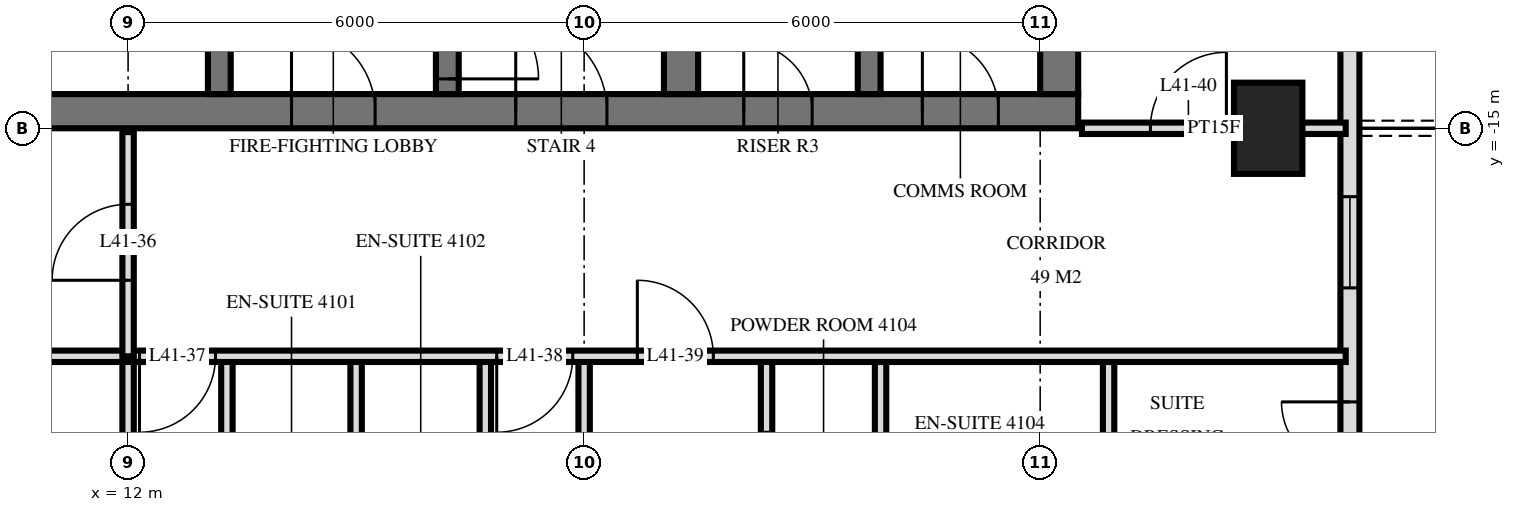
"""IFC4 building model, lengths in metres.
Left out: names, types, materials, properties, quantities, classifications, styles, units other than length and angle.
Written with IfcOpenShell. Run it as: python <this file> out.ifc"""

import sys

from ifc_helpers import new_model, si_unit, direction, frame, frame_2d, origin, origin_2d, place, context, subcontext, project, spatial, rectangle, extrude, element, fill, save


model = new_model("IFC4")
c1 = context("Model", 3, precision=1e-05, world=origin(), true_north=direction((0.0, 1.0)))
c2 = subcontext(c1, "Body", "Model", "MODEL_VIEW")
j1 = project(units=[si_unit("LENGTHUNIT", "METRE"), si_unit("PLANEANGLEUNIT", "RADIAN")], contexts=[c1])
p1 = place(None, origin())
s1 = spatial("IfcSite", under=j1, at=p1, CompositionType="ELEMENT")
p2 = place(p1, origin())
s2 = spatial("IfcBuilding", under=s1, at=p2, CompositionType="ELEMENT")
p3 = place(p2, frame((0.0, 0.0, 159.6)))
s3 = spatial("IfcBuildingStorey", under=s2, at=p3, CompositionType="ELEMENT", Elevation=159.6)
p4 = place(p3, frame((27.0, -15.0, 0.0), z_axis=(0.0, 0.0, 1.0), x_axis=(0.0, 1.0, 0.0)))
e1 = element("IfcColumn", 1, at=p4, inside=s3, PredefinedType="COLUMN", context=c2, shape_type="SweptSolid", body=[
    extrude(rectangle(XDim=1.2, YDim=0.9, at=origin_2d()), origin(), (0.0, 0.0, 1.0), 3.6),
])
p5 = place(p3, frame((10.0, -14.775, 0.0), z_axis=(0.0, 0.0, 1.0), x_axis=(1.0, 0.0, 0.0)))
e2 = element("IfcWall", 2, at=p5, inside=s3, PredefinedType="SHEAR", context=c2, shape_type="SweptSolid", body=[
    extrude(rectangle(XDim=14.5, YDim=0.45, at=frame_2d((7.25, 0.0))), origin(), (0.0, 0.0, 1.0), 3.6),
])
p6 = place(p5, frame((7.1, 0.0, 0.0)))
e3 = element("IfcOpeningElement", 3, at=p6, cuts=e2, PredefinedType="OPENING", context=c2, shape_type="SweptSolid", body=[
    extrude(rectangle(XDim=1.2, YDim=2.1, at=frame_2d((0.6, 1.05))), frame((0.0, 0.235, 0.0), z_axis=(0.0, -1.0, 0.0), x_axis=(1.0, 0.0, 0.0)), (0.0, 0.0, 1.0), 0.47),
])
p7 = place(p5, frame((4.15, 0.0, 0.0)))
e4 = element("IfcOpeningElement", 4, at=p7, cuts=e2, PredefinedType="OPENING", context=c2, shape_type="SweptSolid", body=[
    extrude(rectangle(XDim=1.1, YDim=2.1, at=frame_2d((0.55, 1.05))), frame((0.0, 0.235, 0.0), z_axis=(0.0, -1.0, 0.0), x_axis=(1.0, 0.0, 0.0)), (0.0, 0.0, 1.0), 0.47),
])
p8 = place(p5, frame((10.1, 0.0, 0.0)))
e5 = element("IfcOpeningElement", 5, at=p8, cuts=e2, PredefinedType="OPENING", context=c2, shape_type="SweptSolid", body=[
    extrude(rectangle(XDim=0.9, YDim=2.1, at=frame_2d((0.45, 1.05))), frame((0.0, 0.235, 0.0), z_axis=(0.0, -1.0, 0.0), x_axis=(1.0, 0.0, 0.0)), (0.0, 0.0, 1.0), 0.47),
])
p9 = place(p5, frame((12.45, 0.0, 0.0)))
e6 = element("IfcOpeningElement", 6, at=p9, cuts=e2, PredefinedType="OPENING", context=c2, shape_type="SweptSolid", body=[
    extrude(rectangle(XDim=1.0, YDim=2.1, at=frame_2d((0.5, 1.05))), frame((0.0, 0.235, 0.0), z_axis=(0.0, -1.0, 0.0), x_axis=(1.0, 0.0, 0.0)), (0.0, 0.0, 1.0), 0.47),
])
p10 = place(p3, frame((24.25, -14.55, 0.0), z_axis=(0.0, 0.0, 1.0), x_axis=(0.0, 1.0, 0.0)))
e7 = element("IfcWall", 7, at=p10, inside=s3, PredefinedType="SHEAR", context=c2, shape_type="SweptSolid", body=[
    extrude(rectangle(XDim=14.1, YDim=0.5, at=frame_2d((7.05, 0.0))), origin(), (0.0, 0.0, 1.0), 3.6),
])
p11 = place(p3, frame((13.2, -14.55, 0.0), z_axis=(0.0, 0.0, 1.0), x_axis=(0.0, 1.0, 0.0)))
e8 = element("IfcWall", 8, at=p11, inside=s3, PredefinedType="SHEAR", context=c2, shape_type="SweptSolid", body=[
    extrude(rectangle(XDim=5.4, YDim=0.3, at=frame_2d((2.7, 0.0))), origin(), (0.0, 0.0, 1.0), 3.6),
])
p12 = place(p11, frame((4.0, 0.0, 0.0)))
e9 = element("IfcOpeningElement", 9, at=p12, cuts=e8, PredefinedType="OPENING", context=c2, shape_type="SweptSolid", body=[
    extrude(rectangle(XDim=1.2, YDim=2.1, at=frame_2d((0.6, 1.05))), frame((0.0, 0.16, 0.0), z_axis=(0.0, -1.0, 0.0), x_axis=(1.0, 0.0, 0.0)), (0.0, 0.0, 1.0), 0.32),
])
p13 = place(p3, frame((16.2, -14.55, 0.0), z_axis=(0.0, 0.0, 1.0), x_axis=(0.0, 1.0, 0.0)))
e10 = element("IfcWall", 10, at=p13, inside=s3, PredefinedType="SHEAR", context=c2, shape_type="SweptSolid", body=[
    extrude(rectangle(XDim=5.4, YDim=0.3, at=frame_2d((2.7, 0.0))), origin(), (0.0, 0.0, 1.0), 3.6),
])
p14 = place(p13, frame((0.2, 0.0, 0.0)))
e11 = element("IfcOpeningElement", 11, at=p14, cuts=e10, PredefinedType="OPENING", context=c2, shape_type="SweptSolid", body=[
    extrude(rectangle(XDim=1.2, YDim=2.1, at=frame_2d((0.6, 1.05))), frame((0.0, 0.16, 0.0), z_axis=(0.0, -1.0, 0.0), x_axis=(1.0, 0.0, 0.0)), (0.0, 0.0, 1.0), 0.32),
])
p15 = place(p3, frame((19.275, -14.55, 0.0), z_axis=(0.0, 0.0, 1.0), x_axis=(0.0, 1.0, 0.0)))
e12 = element("IfcWall", 12, at=p15, inside=s3, PredefinedType="SHEAR", context=c2, shape_type="SweptSolid", body=[
    extrude(rectangle(XDim=5.4, YDim=0.45, at=frame_2d((2.7, 0.0))), origin(), (0.0, 0.0, 1.0), 3.6),
])
p16 = place(p3, frame((21.75, -14.55, 0.0), z_axis=(0.0, 0.0, 1.0), x_axis=(0.0, 1.0, 0.0)))
e13 = element("IfcWall", 13, at=p16, inside=s3, PredefinedType="SHEAR", context=c2, shape_type="SweptSolid", body=[
    extrude(rectangle(XDim=5.4, YDim=0.3, at=frame_2d((2.7, 0.0))), origin(), (0.0, 0.0, 1.0), 3.6),
])
p17 = place(p3, frame((28.075, -29.275, 0.0), z_axis=(0.0, 0.0, 1.0), x_axis=(0.0, 1.0, 0.0)))
e14 = element("IfcWall", 14, at=p17, inside=s3, PredefinedType="SOLIDWALL", context=c2, shape_type="SweptSolid", body=[
    extrude(rectangle(XDim=25.951, YDim=0.25, at=frame_2d((12.975, 0.0))), origin(), (0.0, 0.0, 1.0), 3.32),
])
p18 = place(p17, frame((0.575, 0.0, 0.0)))
e15 = element("IfcOpeningElement", 15, at=p18, cuts=e14, PredefinedType="OPENING", context=c2, shape_type="SweptSolid", body=[
    extrude(rectangle(XDim=1.8, YDim=2.4, at=frame_2d((0.9, 1.2))), frame((0.0, 0.135, 0.0), z_axis=(0.0, -1.0, 0.0), x_axis=(1.0, 0.0, 0.0)), (0.0, 0.0, 1.0), 0.27),
])
p19 = place(p17, frame((3.325, 0.0, 0.3)))
e16 = element("IfcOpeningElement", 16, at=p19, cuts=e14, PredefinedType="OPENING", context=c2, shape_type="SweptSolid", body=[
    extrude(rectangle(XDim=1.8, YDim=2.1, at=frame_2d((0.9, 1.05))), frame((0.0, 0.135, 0.0), z_axis=(0.0, -1.0, 0.0), x_axis=(1.0, 0.0, 0.0)), (0.0, 0.0, 1.0), 0.27),
])
p20 = place(p17, frame((8.875, 0.0, 0.0)))
e17 = element("IfcOpeningElement", 17, at=p20, cuts=e14, PredefinedType="OPENING", context=c2, shape_type="SweptSolid", body=[
    extrude(rectangle(XDim=1.8, YDim=2.4, at=frame_2d((0.9, 1.2))), frame((0.0, 0.135, 0.0), z_axis=(0.0, -1.0, 0.0), x_axis=(1.0, 0.0, 0.0)), (0.0, 0.0, 1.0), 0.27),
])
p21 = place(p17, frame((12.175, 0.0, 0.3)))
e18 = element("IfcOpeningElement", 18, at=p21, cuts=e14, PredefinedType="OPENING", context=c2, shape_type="SweptSolid", body=[
    extrude(rectangle(XDim=1.2, YDim=2.1, at=frame_2d((0.6, 1.05))), frame((0.0, 0.135, 0.0), z_axis=(0.0, -1.0, 0.0), x_axis=(1.0, 0.0, 0.0)), (0.0, 0.0, 1.0), 0.27),
])
p22 = place(p17, frame((17.5, 0.0, 0.0)))
e19 = element("IfcOpeningElement", 19, at=p22, cuts=e14, PredefinedType="OPENING", context=c2, shape_type="SweptSolid", body=[
    extrude(rectangle(XDim=1.8, YDim=2.4, at=frame_2d((0.9, 1.2))), frame((0.0, 0.135, 0.0), z_axis=(0.0, -1.0, 0.0), x_axis=(1.0, 0.0, 0.0)), (0.0, 0.0, 1.0), 0.27),
])
p23 = place(p3, frame((24.9, -21.0, 0.0), z_axis=(0.0, 0.0, 1.0), x_axis=(0.0, 1.0, 0.0)))
e20 = element("IfcWall", 20, at=p23, inside=s3, PredefinedType="PARTITIONING", context=c2, shape_type="SweptSolid", body=[
    extrude(rectangle(XDim=3.0, YDim=0.15, at=frame_2d((1.5, 0.0))), origin(), (0.0, 0.0, 1.0), 3.32),
])
p24 = place(p3, frame((21.9, -21.0, 0.0), z_axis=(0.0, 0.0, 1.0), x_axis=(0.0, 1.0, 0.0)))
e21 = element("IfcWall", 21, at=p24, inside=s3, PredefinedType="PLUMBINGWALL", context=c2, shape_type="SweptSolid", body=[
    extrude(rectangle(XDim=3.0, YDim=0.15, at=frame_2d((1.5, 0.0))), origin(), (0.0, 0.0, 1.0), 3.32),
])
p25 = place(p3, frame((20.4, -21.0, 0.0), z_axis=(0.0, 0.0, 1.0), x_axis=(0.0, 1.0, 0.0)))
e22 = element("IfcWall", 22, at=p25, inside=s3, PredefinedType="PARTITIONING", context=c2, shape_type="SweptSolid", body=[
    extrude(rectangle(XDim=3.0, YDim=0.15, at=frame_2d((1.5, 0.0))), origin(), (0.0, 0.0, 1.0), 3.32),
])
p26 = place(p25, frame((1.0, 0.0, 0.0)))
e23 = element("IfcOpeningElement", 23, at=p26, cuts=e22, PredefinedType="OPENING", context=c2, shape_type="SweptSolid", body=[
    extrude(rectangle(XDim=1.0, YDim=2.1, at=frame_2d((0.5, 1.05))), frame((0.0, 0.085, 0.0), z_axis=(0.0, -1.0, 0.0), x_axis=(1.0, 0.0, 0.0)), (0.0, 0.0, 1.0), 0.17),
])
p27 = place(p3, frame((18.0, -21.0, 0.0), z_axis=(0.0, 0.0, 1.0), x_axis=(0.0, 1.0, 0.0)))
e24 = element("IfcWall", 24, at=p27, inside=s3, PredefinedType="PARTITIONING", context=c2, shape_type="SweptSolid", body=[
    extrude(rectangle(XDim=3.0, YDim=0.15, at=frame_2d((1.5, 0.0))), origin(), (0.0, 0.0, 1.0), 3.32),
])
p28 = place(p3, frame((16.7, -21.8, 0.0), z_axis=(0.0, 0.0, 1.0), x_axis=(0.0, 1.0, 0.0)))
e25 = element("IfcWall", 25, at=p28, inside=s3, PredefinedType="PARTITIONING", context=c2, shape_type="SweptSolid", body=[
    extrude(rectangle(XDim=3.8, YDim=0.15, at=frame_2d((1.9, 0.0))), origin(), (0.0, 0.0, 1.0), 3.32),
])
p29 = place(p28, frame((1.5, 0.0, 0.0)))
e26 = element("IfcOpeningElement", 26, at=p29, cuts=e25, PredefinedType="OPENING", context=c2, shape_type="SweptSolid", body=[
    extrude(rectangle(XDim=0.8, YDim=2.1, at=frame_2d((0.4, 1.05))), frame((0.0, 0.085, 0.0), z_axis=(0.0, -1.0, 0.0), x_axis=(1.0, 0.0, 0.0)), (0.0, 0.0, 1.0), 0.17),
])
p30 = place(p3, frame((15.0, -33.62, 0.0), z_axis=(0.0, 0.0, 1.0), x_axis=(0.0, 1.0, 0.0)))
e27 = element("IfcWall", 27, at=p30, inside=s3, PredefinedType="PARTITIONING", context=c2, shape_type="SweptSolid", body=[
    extrude(rectangle(XDim=15.62, YDim=0.15, at=frame_2d((7.81, 0.0))), origin(), (0.0, 0.0, 1.0), 3.32),
])
p31 = place(p3, frame((13.3, -21.8, 0.0), z_axis=(0.0, 0.0, 1.0), x_axis=(0.0, 1.0, 0.0)))
e28 = element("IfcWall", 28, at=p31, inside=s3, PredefinedType="PARTITIONING", context=c2, shape_type="SweptSolid", body=[
    extrude(rectangle(XDim=3.8, YDim=0.15, at=frame_2d((1.9, 0.0))), origin(), (0.0, 0.0, 1.0), 3.32),
])
p32 = place(p31, frame((1.5, 0.0, 0.0)))
e29 = element("IfcOpeningElement", 29, at=p32, cuts=e28, PredefinedType="OPENING", context=c2, shape_type="SweptSolid", body=[
    extrude(rectangle(XDim=0.8, YDim=2.1, at=frame_2d((0.4, 1.05))), frame((0.0, 0.085, 0.0), z_axis=(0.0, -1.0, 0.0), x_axis=(1.0, 0.0, 0.0)), (0.0, 0.0, 1.0), 0.17),
])
p33 = place(p3, frame((12.0, -18.0, 0.0), z_axis=(0.0, 0.0, 1.0), x_axis=(0.0, 1.0, 0.0)))
e30 = element("IfcWall", 30, at=p33, inside=s3, PredefinedType="PARTITIONING", context=c2, shape_type="SweptSolid", body=[
    extrude(rectangle(XDim=2.95, YDim=0.15, at=frame_2d((1.475, 0.0))), origin(), (0.0, 0.0, 1.0), 3.32),
])
p34 = place(p33, frame((1.0, 0.0, 0.0)))
e31 = element("IfcOpeningElement", 31, at=p34, cuts=e30, PredefinedType="OPENING", context=c2, shape_type="SweptSolid", body=[
    extrude(rectangle(XDim=1.0, YDim=2.1, at=frame_2d((0.5, 1.05))), frame((0.0, 0.085, 0.0), z_axis=(0.0, -1.0, 0.0), x_axis=(1.0, 0.0, 0.0)), (0.0, 0.0, 1.0), 0.17),
])
p35 = place(p3, frame((12.0, -33.62, 0.0), z_axis=(0.0, 0.0, 1.0), x_axis=(0.0, 1.0, 0.0)))
e32 = element("IfcWall", 32, at=p35, inside=s3, PredefinedType="PARTITIONING", context=c2, shape_type="SweptSolid", body=[
    extrude(rectangle(XDim=15.62, YDim=0.15, at=frame_2d((7.81, 0.0))), origin(), (0.0, 0.0, 1.0), 3.32),
])
p36 = place(p3, frame((-28.02, -18.0, 0.0), z_axis=(0.0, 0.0, 1.0), x_axis=(1.0, 0.0, 0.0)))
e33 = element("IfcWall", 33, at=p36, inside=s3, PredefinedType="PARTITIONING", context=c2, shape_type="SweptSolid", body=[
    extrude(rectangle(XDim=56.04, YDim=0.15, at=frame_2d((28.02, 0.0))), origin(), (0.0, 0.0, 1.0), 3.32),
])
p37 = place(p36, frame((14.32, 0.0, 0.0)))
e34 = element("IfcOpeningElement", 34, at=p37, cuts=e33, PredefinedType="OPENING", context=c2, shape_type="SweptSolid", body=[
    extrude(rectangle(XDim=1.0, YDim=2.1, at=frame_2d((0.5, 1.05))), frame((0.0, 0.085, 0.0), z_axis=(0.0, -1.0, 0.0), x_axis=(1.0, 0.0, 0.0)), (0.0, 0.0, 1.0), 0.17),
])
p38 = place(p36, frame((40.17, 0.0, 0.0)))
e35 = element("IfcOpeningElement", 35, at=p38, cuts=e33, PredefinedType="OPENING", context=c2, shape_type="SweptSolid", body=[
    extrude(rectangle(XDim=1.0, YDim=2.1, at=frame_2d((0.5, 1.05))), frame((0.0, 0.085, 0.0), z_axis=(0.0, -1.0, 0.0), x_axis=(1.0, 0.0, 0.0)), (0.0, 0.0, 1.0), 0.17),
])
p39 = place(p36, frame((44.87, 0.0, 0.0)))
e36 = element("IfcOpeningElement", 36, at=p39, cuts=e33, PredefinedType="OPENING", context=c2, shape_type="SweptSolid", body=[
    extrude(rectangle(XDim=1.0, YDim=2.1, at=frame_2d((0.5, 1.05))), frame((0.0, 0.085, 0.0), z_axis=(0.0, -1.0, 0.0), x_axis=(1.0, 0.0, 0.0)), (0.0, 0.0, 1.0), 0.17),
])
p40 = place(p36, frame((46.72, 0.0, 0.0)))
e37 = element("IfcOpeningElement", 37, at=p40, cuts=e33, PredefinedType="OPENING", context=c2, shape_type="SweptSolid", body=[
    extrude(rectangle(XDim=1.0, YDim=2.1, at=frame_2d((0.5, 1.05))), frame((0.0, 0.085, 0.0), z_axis=(0.0, -1.0, 0.0), x_axis=(1.0, 0.0, 0.0)), (0.0, 0.0, 1.0), 0.17),
])
p41 = place(p36, frame((18.52, 0.0, 0.0)))
e38 = element("IfcOpeningElement", 38, at=p41, cuts=e33, PredefinedType="OPENING", context=c2, shape_type="SweptSolid", body=[
    extrude(rectangle(XDim=1.0, YDim=2.1, at=frame_2d((0.5, 1.05))), frame((0.0, 0.085, 0.0), z_axis=(0.0, -1.0, 0.0), x_axis=(1.0, 0.0, 0.0)), (0.0, 0.0, 1.0), 0.17),
])
p42 = place(p36, frame((24.52, 0.0, 0.0)))
e39 = element("IfcOpeningElement", 39, at=p42, cuts=e33, PredefinedType="OPENING", context=c2, shape_type="SweptSolid", body=[
    extrude(rectangle(XDim=1.0, YDim=2.1, at=frame_2d((0.5, 1.05))), frame((0.0, 0.085, 0.0), z_axis=(0.0, -1.0, 0.0), x_axis=(1.0, 0.0, 0.0)), (0.0, 0.0, 1.0), 0.17),
])
p43 = place(p36, frame((30.52, 0.0, 0.0)))
e40 = element("IfcOpeningElement", 40, at=p43, cuts=e33, PredefinedType="OPENING", context=c2, shape_type="SweptSolid", body=[
    extrude(rectangle(XDim=1.0, YDim=2.1, at=frame_2d((0.5, 1.05))), frame((0.0, 0.085, 0.0), z_axis=(0.0, -1.0, 0.0), x_axis=(1.0, 0.0, 0.0)), (0.0, 0.0, 1.0), 0.17),
])
p44 = place(p36, frame((36.52, 0.0, 0.0)))
e41 = element("IfcOpeningElement", 41, at=p44, cuts=e33, PredefinedType="OPENING", context=c2, shape_type="SweptSolid", body=[
    extrude(rectangle(XDim=1.0, YDim=2.1, at=frame_2d((0.5, 1.05))), frame((0.0, 0.085, 0.0), z_axis=(0.0, -1.0, 0.0), x_axis=(1.0, 0.0, 0.0)), (0.0, 0.0, 1.0), 0.17),
])
p45 = place(p3, frame((24.55, -15.0, 0.0), z_axis=(0.0, 0.0, 1.0), x_axis=(1.0, 0.0, 0.0)))
e42 = element("IfcWall", 42, at=p45, inside=s3, PredefinedType="PARTITIONING", context=c2, shape_type="SweptSolid", body=[
    extrude(rectangle(XDim=3.47, YDim=0.15, at=frame_2d((1.735, 0.0))), origin(), (0.0, 0.0, 1.0), 3.32),
])
p46 = place(p45, frame((0.9, 0.0, 0.0)))
e43 = element("IfcOpeningElement", 43, at=p46, cuts=e42, PredefinedType="OPENING", context=c2, shape_type="SweptSolid", body=[
    extrude(rectangle(XDim=1.0, YDim=2.1, at=frame_2d((0.5, 1.05))), frame((0.0, 0.085, 0.0), z_axis=(0.0, -1.0, 0.0), x_axis=(1.0, 0.0, 0.0)), (0.0, 0.0, 1.0), 0.17),
])
p47 = place(p20, origin())
e44 = element("IfcDoor", 44, at=p47, inside=s3, OperationType="DOUBLE_DOOR_SINGLE_SWING", PredefinedType="DOOR", context=c2, shape_type="SweptSolid", body=[
    extrude(rectangle(XDim=1.8, YDim=2.4, at=frame_2d((0.9, 1.2))), frame((0.0, 0.025, 0.0), z_axis=(0.0, -1.0, 0.0), x_axis=(1.0, 0.0, 0.0)), (0.0, 0.0, 1.0), 0.05),
])
fill(e17, e44)
p48 = place(p21, origin())
e45 = element("IfcWindow", 45, at=p48, inside=s3, PartitioningType="SINGLE_PANEL", PredefinedType="WINDOW", context=c2, shape_type="SweptSolid", body=[
    extrude(rectangle(XDim=1.2, YDim=2.1, at=frame_2d((0.6, 1.05))), frame((0.0, 0.03, 0.0), z_axis=(0.0, -1.0, 0.0), x_axis=(1.0, 0.0, 0.0)), (0.0, 0.0, 1.0), 0.06),
])
fill(e18, e45)
p49 = place(p6, origin())
e46 = element("IfcDoor", 46, at=p49, inside=s3, OperationType="SINGLE_SWING_RIGHT", PredefinedType="DOOR", context=c2, shape_type="SweptSolid", body=[
    extrude(rectangle(XDim=1.2, YDim=2.1, at=frame_2d((0.6, 1.05))), frame((0.0, 0.025, 0.0), z_axis=(0.0, -1.0, 0.0), x_axis=(1.0, 0.0, 0.0)), (0.0, 0.0, 1.0), 0.05),
])
fill(e3, e46)
p50 = place(p7, origin())
e47 = element("IfcDoor", 47, at=p50, inside=s3, OperationType="SINGLE_SWING_RIGHT", PredefinedType="DOOR", context=c2, shape_type="SweptSolid", body=[
    extrude(rectangle(XDim=1.1, YDim=2.1, at=frame_2d((0.55, 1.05))), frame((0.0, 0.025, 0.0), z_axis=(0.0, -1.0, 0.0), x_axis=(1.0, 0.0, 0.0)), (0.0, 0.0, 1.0), 0.05),
])
fill(e4, e47)
p51 = place(p8, origin())
e48 = element("IfcDoor", 48, at=p51, inside=s3, OperationType="SINGLE_SWING_RIGHT", PredefinedType="DOOR", context=c2, shape_type="SweptSolid", body=[
    extrude(rectangle(XDim=0.9, YDim=2.1, at=frame_2d((0.45, 1.05))), frame((0.0, 0.025, 0.0), z_axis=(0.0, -1.0, 0.0), x_axis=(1.0, 0.0, 0.0)), (0.0, 0.0, 1.0), 0.05),
])
fill(e5, e48)
p52 = place(p9, origin())
e49 = element("IfcDoor", 49, at=p52, inside=s3, OperationType="SINGLE_SWING_RIGHT", PredefinedType="DOOR", context=c2, shape_type="SweptSolid", body=[
    extrude(rectangle(XDim=1.0, YDim=2.1, at=frame_2d((0.5, 1.05))), frame((0.0, 0.025, 0.0), z_axis=(0.0, -1.0, 0.0), x_axis=(1.0, 0.0, 0.0)), (0.0, 0.0, 1.0), 0.05),
])
fill(e6, e49)
p53 = place(p14, frame((0.6, 0.0, 0.0), z_axis=(0.0, 0.0, 1.0), x_axis=(-1.0, 0.0, 0.0)))
e50 = element("IfcDoor", 50, at=p53, inside=s3, OperationType="SINGLE_SWING_LEFT", PredefinedType="DOOR", context=c2, shape_type="SweptSolid", body=[
    extrude(rectangle(XDim=1.2, YDim=2.1, at=frame_2d((0.0, 1.05))), frame((0.0, -0.025, 0.0), z_axis=(0.0, 1.0, 0.0), x_axis=(-1.0, 0.0, 0.0)), (0.0, 0.0, 1.0), 0.05),
])
fill(e11, e50)
p54 = place(p34, origin())
e51 = element("IfcDoor", 51, at=p54, inside=s3, OperationType="SINGLE_SWING_RIGHT", PredefinedType="DOOR", context=c2, shape_type="SweptSolid", body=[
    extrude(rectangle(XDim=1.0, YDim=2.1, at=frame_2d((0.5, 1.05))), frame((0.0, 0.025, 0.0), z_axis=(0.0, -1.0, 0.0), x_axis=(1.0, 0.0, 0.0)), (0.0, 0.0, 1.0), 0.05),
])
fill(e31, e51)
p55 = place(p38, frame((0.5, 0.0, 0.0), z_axis=(0.0, 0.0, 1.0), x_axis=(-1.0, 0.0, 0.0)))
e52 = element("IfcDoor", 52, at=p55, inside=s3, OperationType="SINGLE_SWING_LEFT", PredefinedType="DOOR", context=c2, shape_type="SweptSolid", body=[
    extrude(rectangle(XDim=1.0, YDim=2.1, at=frame_2d((0.0, 1.05))), frame((0.0, -0.025, 0.0), z_axis=(0.0, 1.0, 0.0), x_axis=(-1.0, 0.0, 0.0)), (0.0, 0.0, 1.0), 0.05),
])
fill(e35, e52)
p56 = place(p39, frame((0.5, 0.0, 0.0), z_axis=(0.0, 0.0, 1.0), x_axis=(-1.0, 0.0, 0.0)))
e53 = element("IfcDoor", 53, at=p56, inside=s3, OperationType="SINGLE_SWING_LEFT", PredefinedType="DOOR", context=c2, shape_type="SweptSolid", body=[
    extrude(rectangle(XDim=1.0, YDim=2.1, at=frame_2d((0.0, 1.05))), frame((0.0, -0.025, 0.0), z_axis=(0.0, 1.0, 0.0), x_axis=(-1.0, 0.0, 0.0)), (0.0, 0.0, 1.0), 0.05),
])
fill(e36, e53)
p57 = place(p40, origin())
e54 = element("IfcDoor", 54, at=p57, inside=s3, OperationType="SINGLE_SWING_RIGHT", PredefinedType="DOOR", context=c2, shape_type="SweptSolid", body=[
    extrude(rectangle(XDim=1.0, YDim=2.1, at=frame_2d((0.5, 1.05))), frame((0.0, 0.025, 0.0), z_axis=(0.0, -1.0, 0.0), x_axis=(1.0, 0.0, 0.0)), (0.0, 0.0, 1.0), 0.05),
])
fill(e37, e54)
p58 = place(p46, origin())
e55 = element("IfcDoor", 55, at=p58, inside=s3, OperationType="SINGLE_SWING_LEFT", PredefinedType="DOOR", context=c2, shape_type="SweptSolid", body=[
    extrude(rectangle(XDim=1.0, YDim=2.1, at=frame_2d((0.5, 1.05))), frame((0.0, 0.025, 0.0), z_axis=(0.0, -1.0, 0.0), x_axis=(1.0, 0.0, 0.0)), (0.0, 0.0, 1.0), 0.05),
])
fill(e43, e55)
save(model, sys.argv[1])
